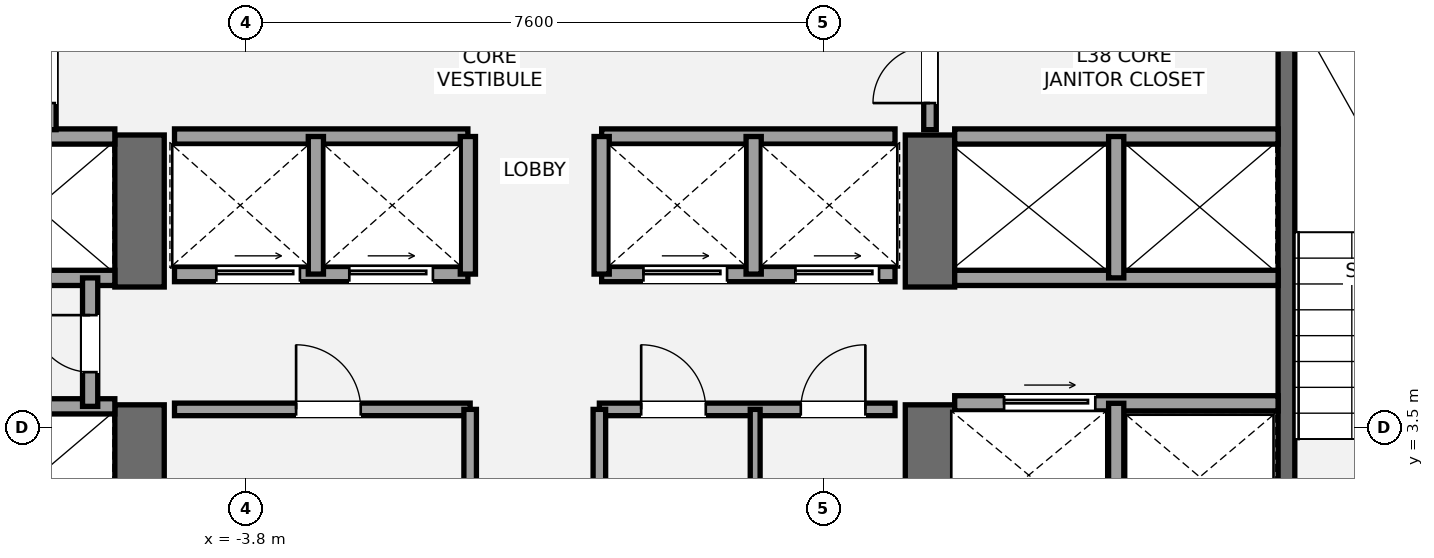
"""IFC4 building model, lengths in metres.
Left out: names, types, materials, properties, quantities, classifications, styles, units other than length and angle.
Written with IfcOpenShell. Run it as: python <this file> out.ifc"""

import sys

from ifc_helpers import new_model, si_unit, direction, frame, frame_2d, origin, place, context, subcontext, project, spatial, rectangle, extrude, element, fill, save


model = new_model("IFC4")
c1 = context("Model", 3, precision=1e-05, world=origin(), true_north=direction((0.0, 1.0)))
c2 = subcontext(c1, "Body", "Model", "MODEL_VIEW")
j1 = project(units=[si_unit("LENGTHUNIT", "METRE"), si_unit("PLANEANGLEUNIT", "RADIAN")], contexts=[c1])
p1 = place(None, origin())
s1 = spatial("IfcSite", under=j1, at=p1, CompositionType="ELEMENT")
p2 = place(p1, origin())
s2 = spatial("IfcBuilding", under=s1, at=p2, CompositionType="ELEMENT")
p3 = place(p2, frame((0.0, 0.0, 143.8)))
s3 = spatial("IfcBuildingStorey", under=s2, at=p3, CompositionType="ELEMENT", Elevation=143.8)
p4 = place(p3, frame((-5.2, 1.2, 0.0), z_axis=(0.0, 0.0, 1.0), x_axis=(0.0, 1.0, 0.0)))
e1 = element("IfcWall", 1, at=p4, inside=s3, PredefinedType="SHEAR", context=c2, shape_type="SweptSolid", body=[
    extrude(rectangle(XDim=2.6, YDim=0.65, at=frame_2d((1.3, 0.0))), origin(), (0.0, 0.0, 1.0), 3.2),
])
p5 = place(p3, frame((-5.2, 5.35, 0.0), z_axis=(0.0, 0.0, 1.0), x_axis=(0.0, 1.0, 0.0)))
e2 = element("IfcWall", 2, at=p5, inside=s3, PredefinedType="SHEAR", context=c2, shape_type="SweptSolid", body=[
    extrude(rectangle(XDim=2.0, YDim=0.65, at=frame_2d((1.0, 0.0))), origin(), (0.0, 0.0, 1.0), 3.2),
])
p6 = place(p3, frame((5.2, 1.2, 0.0), z_axis=(0.0, 0.0, 1.0), x_axis=(0.0, 1.0, 0.0)))
e3 = element("IfcWall", 3, at=p6, inside=s3, PredefinedType="SHEAR", context=c2, shape_type="SweptSolid", body=[
    extrude(rectangle(XDim=2.6, YDim=0.65, at=frame_2d((1.3, 0.0))), origin(), (0.0, 0.0, 1.0), 3.2),
])
p7 = place(p3, frame((5.2, 5.35, 0.0), z_axis=(0.0, 0.0, 1.0), x_axis=(0.0, 1.0, 0.0)))
e4 = element("IfcWall", 4, at=p7, inside=s3, PredefinedType="SHEAR", context=c2, shape_type="SweptSolid", body=[
    extrude(rectangle(XDim=2.0, YDim=0.65, at=frame_2d((1.0, 0.0))), origin(), (0.0, 0.0, 1.0), 3.2),
])
p8 = place(p3, frame((9.89, 1.85, 0.0), z_axis=(0.0, 0.0, 1.0), x_axis=(0.0, 1.0, 0.0)))
e5 = element("IfcWall", 5, at=p8, inside=s3, PredefinedType="SHEAR", context=c2, shape_type="SweptSolid", body=[
    extrude(rectangle(XDim=7.15, YDim=0.22, at=frame_2d((3.575, 0.0))), origin(), (0.0, 0.0, 1.0), 3.2),
])
for number, where, z_axis, x_axis in (
    (6, (-9.78, 3.78, 0.0), (0.0, 0.0, 1.0), (1.0, 0.0, 0.0)),
    (7, (-9.78, 5.47, 0.0), (0.0, 0.0, 1.0), (1.0, 0.0, 0.0)),
    (8, (-9.78, 7.33, 0.0), (0.0, 0.0, 1.0), (1.0, 0.0, 0.0)),
):
    element("IfcWall", number, at=place(p3, frame(where, z_axis=z_axis, x_axis=x_axis)), inside=s3, PredefinedType="SOLIDWALL", context=c2, shape_type="SweptSolid", body=[
        extrude(rectangle(XDim=4.255, YDim=0.2, at=frame_2d((2.127, 0.0))), origin(), (0.0, 0.0, 1.0), 3.02),
    ])
p9 = place(p3, frame((-5.85, 3.78, 0.0), z_axis=(0.0, 0.0, 1.0), x_axis=(0.0, 1.0, 0.0)))
e9 = element("IfcWall", 9, at=p9, inside=s3, PredefinedType="SOLIDWALL", context=c2, shape_type="SweptSolid", body=[
    extrude(rectangle(XDim=1.69, YDim=0.2, at=frame_2d((0.845, 0.0))), origin(), (0.0, 0.0, 1.0), 3.02),
])
p10 = place(p9, frame((0.45, 0.0, 0.0)))
e10 = element("IfcOpeningElement", 10, at=p10, cuts=e9, PredefinedType="OPENING", context=c2, shape_type="SweptSolid", body=[
    extrude(rectangle(XDim=0.75, YDim=2.1, at=frame_2d((0.375, 1.05))), frame((0.0, 0.11, 0.0), z_axis=(0.0, -1.0, 0.0), x_axis=(1.0, 0.0, 0.0)), (0.0, 0.0, 1.0), 0.22),
])
p11 = place(p3, frame((5.525, 3.82, 0.0), z_axis=(0.0, 0.0, 1.0), x_axis=(1.0, 0.0, 0.0)))
e11 = element("IfcWall", 11, at=p11, inside=s3, PredefinedType="SOLIDWALL", context=c2, shape_type="SweptSolid", body=[
    extrude(rectangle(XDim=4.255, YDim=0.2, at=frame_2d((2.127, 0.0))), origin(), (0.0, 0.0, 1.0), 3.02),
])
p12 = place(p11, frame((0.65, 0.0, 0.0)))
e12 = element("IfcOpeningElement", 12, at=p12, cuts=e11, PredefinedType="OPENING", context=c2, shape_type="SweptSolid", body=[
    extrude(rectangle(XDim=1.2, YDim=2.2, at=frame_2d((0.6, 1.1))), frame((0.0, 0.11, 0.0), z_axis=(0.0, -1.0, 0.0), x_axis=(1.0, 0.0, 0.0)), (0.0, 0.0, 1.0), 0.22),
])
p13 = place(p3, frame((7.65, 1.85, 0.0), z_axis=(0.0, 0.0, 1.0), x_axis=(0.0, 1.0, 0.0)))
e13 = element("IfcWall", 13, at=p13, inside=s3, PredefinedType="SOLIDWALL", context=c2, shape_type="SweptSolid", body=[
    extrude(rectangle(XDim=1.97, YDim=0.2, at=frame_2d((0.985, 0.0))), origin(), (0.0, 0.0, 1.0), 3.02),
])
for number, where, z_axis, x_axis in (
    (14, (5.525, 5.47, 0.0), (0.0, 0.0, 1.0), (1.0, 0.0, 0.0)),
    (15, (5.525, 7.33, 0.0), (0.0, 0.0, 1.0), (1.0, 0.0, 0.0)),
):
    element("IfcWall", number, at=place(p3, frame(where, z_axis=z_axis, x_axis=x_axis)), inside=s3, PredefinedType="SOLIDWALL", context=c2, shape_type="SweptSolid", body=[
        extrude(rectangle(XDim=4.255, YDim=0.2, at=frame_2d((2.127, 0.0))), origin(), (0.0, 0.0, 1.0), 3.02),
    ])
p14 = place(p3, frame((7.65, 5.47, 0.0), z_axis=(0.0, 0.0, 1.0), x_axis=(0.0, 1.0, 0.0)))
e16 = element("IfcWall", 16, at=p14, inside=s3, PredefinedType="SOLIDWALL", context=c2, shape_type="SweptSolid", body=[
    extrude(rectangle(XDim=1.86, YDim=0.2, at=frame_2d((0.93, 0.0))), origin(), (0.0, 0.0, 1.0), 3.02),
])
p15 = place(p3, frame((-4.74, 3.74, 0.0), z_axis=(0.0, 0.0, 1.0), x_axis=(1.0, 0.0, 0.0)))
e17 = element("IfcWall", 17, at=p15, inside=s3, PredefinedType="PARTITIONING", context=c2, shape_type="SweptSolid", body=[
    extrude(rectangle(XDim=3.89, YDim=0.165, at=frame_2d((1.945, 0.0))), origin(), (0.0, 0.0, 1.0), 3.02),
])
p16 = place(p15, frame((1.6, 0.0, 0.0)))
e18 = element("IfcOpeningElement", 18, at=p16, cuts=e17, PredefinedType="OPENING", context=c2, shape_type="SweptSolid", body=[
    extrude(rectangle(XDim=0.85, YDim=2.1, at=frame_2d((0.425, 1.05))), frame((0.0, 0.093, 0.0), z_axis=(0.0, -1.0, 0.0), x_axis=(1.0, 0.0, 0.0)), (0.0, 0.0, 1.0), 0.185),
])
p17 = place(p3, frame((-0.85, 1.92, 0.0), z_axis=(0.0, 0.0, 1.0), x_axis=(0.0, 1.0, 0.0)))
e19 = element("IfcWall", 19, at=p17, inside=s3, PredefinedType="PARTITIONING", context=c2, shape_type="SweptSolid", body=[
    extrude(rectangle(XDim=1.82, YDim=0.165, at=frame_2d((0.91, 0.0))), origin(), (0.0, 0.0, 1.0), 3.02),
])
p18 = place(p3, frame((0.85, 3.74, 0.0), z_axis=(0.0, 0.0, 1.0), x_axis=(1.0, 0.0, 0.0)))
e20 = element("IfcWall", 20, at=p18, inside=s3, PredefinedType="PARTITIONING", context=c2, shape_type="SweptSolid", body=[
    extrude(rectangle(XDim=3.89, YDim=0.165, at=frame_2d((1.945, 0.0))), origin(), (0.0, 0.0, 1.0), 3.02),
])
p19 = place(p18, frame((0.55, 0.0, 0.0)))
e21 = element("IfcOpeningElement", 21, at=p19, cuts=e20, PredefinedType="OPENING", context=c2, shape_type="SweptSolid", body=[
    extrude(rectangle(XDim=0.85, YDim=2.1, at=frame_2d((0.425, 1.05))), frame((0.0, 0.093, 0.0), z_axis=(0.0, -1.0, 0.0), x_axis=(1.0, 0.0, 0.0)), (0.0, 0.0, 1.0), 0.185),
])
p20 = place(p18, frame((2.65, 0.0, 0.0)))
e22 = element("IfcOpeningElement", 22, at=p20, cuts=e20, PredefinedType="OPENING", context=c2, shape_type="SweptSolid", body=[
    extrude(rectangle(XDim=0.85, YDim=2.1, at=frame_2d((0.425, 1.05))), frame((0.0, 0.093, 0.0), z_axis=(0.0, -1.0, 0.0), x_axis=(1.0, 0.0, 0.0)), (0.0, 0.0, 1.0), 0.185),
])
p21 = place(p3, frame((0.85, 1.92, 0.0), z_axis=(0.0, 0.0, 1.0), x_axis=(0.0, 1.0, 0.0)))
e23 = element("IfcWall", 23, at=p21, inside=s3, PredefinedType="PARTITIONING", context=c2, shape_type="SweptSolid", body=[
    extrude(rectangle(XDim=1.82, YDim=0.165, at=frame_2d((0.91, 0.0))), origin(), (0.0, 0.0, 1.0), 3.02),
])
p22 = place(p3, frame((2.9, 1.92, 0.0), z_axis=(0.0, 0.0, 1.0), x_axis=(0.0, 1.0, 0.0)))
e24 = element("IfcWall", 24, at=p22, inside=s3, PredefinedType="PARTITIONING", context=c2, shape_type="SweptSolid", body=[
    extrude(rectangle(XDim=1.82, YDim=0.13, at=frame_2d((0.91, 0.0))), origin(), (0.0, 0.0, 1.0), 3.02),
])
p23 = place(p3, frame((-4.74, 5.52, 0.0), z_axis=(0.0, 0.0, 1.0), x_axis=(1.0, 0.0, 0.0)))
e25 = element("IfcWall", 25, at=p23, inside=s3, PredefinedType="SOLIDWALL", context=c2, shape_type="SweptSolid", body=[
    extrude(rectangle(XDim=3.86, YDim=0.2, at=frame_2d((1.93, 0.0))), origin(), (0.0, 0.0, 1.0), 3.02),
])
p24 = place(p23, frame((0.55, 0.0, 0.0)))
e26 = element("IfcOpeningElement", 26, at=p24, cuts=e25, PredefinedType="OPENING", context=c2, shape_type="SweptSolid", body=[
    extrude(rectangle(XDim=1.1, YDim=2.2, at=frame_2d((0.55, 1.1))), frame((0.0, 0.11, 0.0), z_axis=(0.0, -1.0, 0.0), x_axis=(1.0, 0.0, 0.0)), (0.0, 0.0, 1.0), 0.22),
])
p25 = place(p23, frame((2.3, 0.0, 0.0)))
e27 = element("IfcOpeningElement", 27, at=p25, cuts=e25, PredefinedType="OPENING", context=c2, shape_type="SweptSolid", body=[
    extrude(rectangle(XDim=1.1, YDim=2.2, at=frame_2d((0.55, 1.1))), frame((0.0, 0.11, 0.0), z_axis=(0.0, -1.0, 0.0), x_axis=(1.0, 0.0, 0.0)), (0.0, 0.0, 1.0), 0.22),
])
p26 = place(p3, frame((0.88, 5.52, 0.0), z_axis=(0.0, 0.0, 1.0), x_axis=(1.0, 0.0, 0.0)))
e28 = element("IfcWall", 28, at=p26, inside=s3, PredefinedType="SOLIDWALL", context=c2, shape_type="SweptSolid", body=[
    extrude(rectangle(XDim=3.86, YDim=0.2, at=frame_2d((1.93, 0.0))), origin(), (0.0, 0.0, 1.0), 3.02),
])
p27 = place(p26, frame((0.55, 0.0, 0.0)))
e29 = element("IfcOpeningElement", 29, at=p27, cuts=e28, PredefinedType="OPENING", context=c2, shape_type="SweptSolid", body=[
    extrude(rectangle(XDim=1.1, YDim=2.2, at=frame_2d((0.55, 1.1))), frame((0.0, 0.11, 0.0), z_axis=(0.0, -1.0, 0.0), x_axis=(1.0, 0.0, 0.0)), (0.0, 0.0, 1.0), 0.22),
])
p28 = place(p26, frame((2.55, 0.0, 0.0)))
e30 = element("IfcOpeningElement", 30, at=p28, cuts=e28, PredefinedType="OPENING", context=c2, shape_type="SweptSolid", body=[
    extrude(rectangle(XDim=1.1, YDim=2.2, at=frame_2d((0.55, 1.1))), frame((0.0, 0.11, 0.0), z_axis=(0.0, -1.0, 0.0), x_axis=(1.0, 0.0, 0.0)), (0.0, 0.0, 1.0), 0.22),
])
for number, where, z_axis, x_axis in (
    (31, (-4.74, 7.33, 0.0), (0.0, 0.0, 1.0), (1.0, 0.0, 0.0)),
    (32, (0.88, 7.33, 0.0), (0.0, 0.0, 1.0), (1.0, 0.0, 0.0)),
):
    element("IfcWall", number, at=place(p3, frame(where, z_axis=z_axis, x_axis=x_axis)), inside=s3, PredefinedType="SOLIDWALL", context=c2, shape_type="SweptSolid", body=[
        extrude(rectangle(XDim=3.86, YDim=0.2, at=frame_2d((1.93, 0.0))), origin(), (0.0, 0.0, 1.0), 3.02),
    ])
for number, where, z_axis, x_axis in (
    (33, (-2.88, 5.52, 0.0), (0.0, 0.0, 1.0), (0.0, 1.0, 0.0)),
    (34, (2.88, 5.52, 0.0), (0.0, 0.0, 1.0), (0.0, 1.0, 0.0)),
    (35, (-0.88, 5.52, 0.0), (0.0, 0.0, 1.0), (0.0, 1.0, 0.0)),
    (36, (0.88, 5.52, 0.0), (0.0, 0.0, 1.0), (0.0, 1.0, 0.0)),
):
    element("IfcWall", number, at=place(p3, frame(where, z_axis=z_axis, x_axis=x_axis)), inside=s3, PredefinedType="SOLIDWALL", context=c2, shape_type="SweptSolid", body=[
        extrude(rectangle(XDim=1.81, YDim=0.2, at=frame_2d((0.905, 0.0))), origin(), (0.0, 0.0, 1.0), 3.02),
    ])
p29 = place(p3, frame((-6.38, 7.42, 0.0), z_axis=(0.0, 0.0, 1.0), x_axis=(0.0, 1.0, 0.0)))
e37 = element("IfcWall", 37, at=p29, inside=s3, PredefinedType="PARTITIONING", context=c2, shape_type="SweptSolid", body=[
    extrude(rectangle(XDim=1.58, YDim=0.165, at=frame_2d((0.79, 0.0))), origin(), (0.0, 0.0, 1.0), 3.02),
])
p30 = place(p29, frame((0.35, 0.0, 0.0)))
e38 = element("IfcOpeningElement", 38, at=p30, cuts=e37, PredefinedType="OPENING", context=c2, shape_type="SweptSolid", body=[
    extrude(rectangle(XDim=0.75, YDim=2.1, at=frame_2d((0.375, 1.05))), frame((0.0, 0.093, 0.0), z_axis=(0.0, -1.0, 0.0), x_axis=(1.0, 0.0, 0.0)), (0.0, 0.0, 1.0), 0.185),
])
p31 = place(p3, frame((5.2, 7.42, 0.0), z_axis=(0.0, 0.0, 1.0), x_axis=(0.0, 1.0, 0.0)))
e39 = element("IfcWall", 39, at=p31, inside=s3, PredefinedType="PARTITIONING", context=c2, shape_type="SweptSolid", body=[
    extrude(rectangle(XDim=1.58, YDim=0.165, at=frame_2d((0.79, 0.0))), origin(), (0.0, 0.0, 1.0), 3.02),
])
p32 = place(p31, frame((0.35, 0.0, 0.0)))
e40 = element("IfcOpeningElement", 40, at=p32, cuts=e39, PredefinedType="OPENING", context=c2, shape_type="SweptSolid", body=[
    extrude(rectangle(XDim=0.75, YDim=2.1, at=frame_2d((0.375, 1.05))), frame((0.0, 0.093, 0.0), z_axis=(0.0, -1.0, 0.0), x_axis=(1.0, 0.0, 0.0)), (0.0, 0.0, 1.0), 0.185),
])
p33 = place(p10, origin())
e41 = element("IfcDoor", 41, at=p33, inside=s3, OperationType="SINGLE_SWING_RIGHT", PredefinedType="DOOR", context=c2, shape_type="SweptSolid", body=[
    extrude(rectangle(XDim=0.75, YDim=2.1, at=frame_2d((0.375, 1.05))), frame((0.0, 0.025, 0.0), z_axis=(0.0, -1.0, 0.0), x_axis=(1.0, 0.0, 0.0)), (0.0, 0.0, 1.0), 0.05),
])
fill(e10, e41)
p34 = place(p12, origin())
e42 = element("IfcDoor", 42, at=p34, inside=s3, OperationType="SLIDING_TO_RIGHT", PredefinedType="DOOR", context=c2, shape_type="SweptSolid", body=[
    extrude(rectangle(XDim=1.2, YDim=2.2, at=frame_2d((0.6, 1.1))), frame((0.0, 0.025, 0.0), z_axis=(0.0, -1.0, 0.0), x_axis=(1.0, 0.0, 0.0)), (0.0, 0.0, 1.0), 0.05),
])
fill(e12, e42)
p35 = place(p16, origin())
e43 = element("IfcDoor", 43, at=p35, inside=s3, OperationType="SINGLE_SWING_LEFT", PredefinedType="DOOR", context=c2, shape_type="SweptSolid", body=[
    extrude(rectangle(XDim=0.85, YDim=2.1, at=frame_2d((0.425, 1.05))), frame((0.0, 0.025, 0.0), z_axis=(0.0, -1.0, 0.0), x_axis=(1.0, 0.0, 0.0)), (0.0, 0.0, 1.0), 0.05),
])
fill(e18, e43)
p36 = place(p19, origin())
e44 = element("IfcDoor", 44, at=p36, inside=s3, OperationType="SINGLE_SWING_LEFT", PredefinedType="DOOR", context=c2, shape_type="SweptSolid", body=[
    extrude(rectangle(XDim=0.85, YDim=2.1, at=frame_2d((0.425, 1.05))), frame((0.0, 0.025, 0.0), z_axis=(0.0, -1.0, 0.0), x_axis=(1.0, 0.0, 0.0)), (0.0, 0.0, 1.0), 0.05),
])
fill(e21, e44)
p37 = place(p20, origin())
e45 = element("IfcDoor", 45, at=p37, inside=s3, OperationType="SINGLE_SWING_RIGHT", PredefinedType="DOOR", context=c2, shape_type="SweptSolid", body=[
    extrude(rectangle(XDim=0.85, YDim=2.1, at=frame_2d((0.425, 1.05))), frame((0.0, 0.025, 0.0), z_axis=(0.0, -1.0, 0.0), x_axis=(1.0, 0.0, 0.0)), (0.0, 0.0, 1.0), 0.05),
])
fill(e22, e45)
p38 = place(p24, origin())
e46 = element("IfcDoor", 46, at=p38, inside=s3, OperationType="SLIDING_TO_LEFT", PredefinedType="DOOR", context=c2, shape_type="SweptSolid", body=[
    extrude(rectangle(XDim=1.1, YDim=2.2, at=frame_2d((0.55, 1.1))), frame((0.0, 0.025, 0.0), z_axis=(0.0, -1.0, 0.0), x_axis=(1.0, 0.0, 0.0)), (0.0, 0.0, 1.0), 0.05),
])
fill(e26, e46)
p39 = place(p25, origin())
e47 = element("IfcDoor", 47, at=p39, inside=s3, OperationType="SLIDING_TO_LEFT", PredefinedType="DOOR", context=c2, shape_type="SweptSolid", body=[
    extrude(rectangle(XDim=1.1, YDim=2.2, at=frame_2d((0.55, 1.1))), frame((0.0, 0.025, 0.0), z_axis=(0.0, -1.0, 0.0), x_axis=(1.0, 0.0, 0.0)), (0.0, 0.0, 1.0), 0.05),
])
fill(e27, e47)
p40 = place(p27, origin())
e48 = element("IfcDoor", 48, at=p40, inside=s3, OperationType="SLIDING_TO_LEFT", PredefinedType="DOOR", context=c2, shape_type="SweptSolid", body=[
    extrude(rectangle(XDim=1.1, YDim=2.2, at=frame_2d((0.55, 1.1))), frame((0.0, 0.025, 0.0), z_axis=(0.0, -1.0, 0.0), x_axis=(1.0, 0.0, 0.0)), (0.0, 0.0, 1.0), 0.05),
])
fill(e29, e48)
p41 = place(p28, origin())
e49 = element("IfcDoor", 49, at=p41, inside=s3, OperationType="SLIDING_TO_LEFT", PredefinedType="DOOR", context=c2, shape_type="SweptSolid", body=[
    extrude(rectangle(XDim=1.1, YDim=2.2, at=frame_2d((0.55, 1.1))), frame((0.0, 0.025, 0.0), z_axis=(0.0, -1.0, 0.0), x_axis=(1.0, 0.0, 0.0)), (0.0, 0.0, 1.0), 0.05),
])
fill(e30, e49)
p42 = place(p32, origin())
e50 = element("IfcDoor", 50, at=p42, inside=s3, OperationType="SINGLE_SWING_LEFT", PredefinedType="DOOR", context=c2, shape_type="SweptSolid", body=[
    extrude(rectangle(XDim=0.75, YDim=2.1, at=frame_2d((0.375, 1.05))), frame((0.0, 0.025, 0.0), z_axis=(0.0, -1.0, 0.0), x_axis=(1.0, 0.0, 0.0)), (0.0, 0.0, 1.0), 0.05),
])
fill(e40, e50)
save(model, sys.argv[1])
